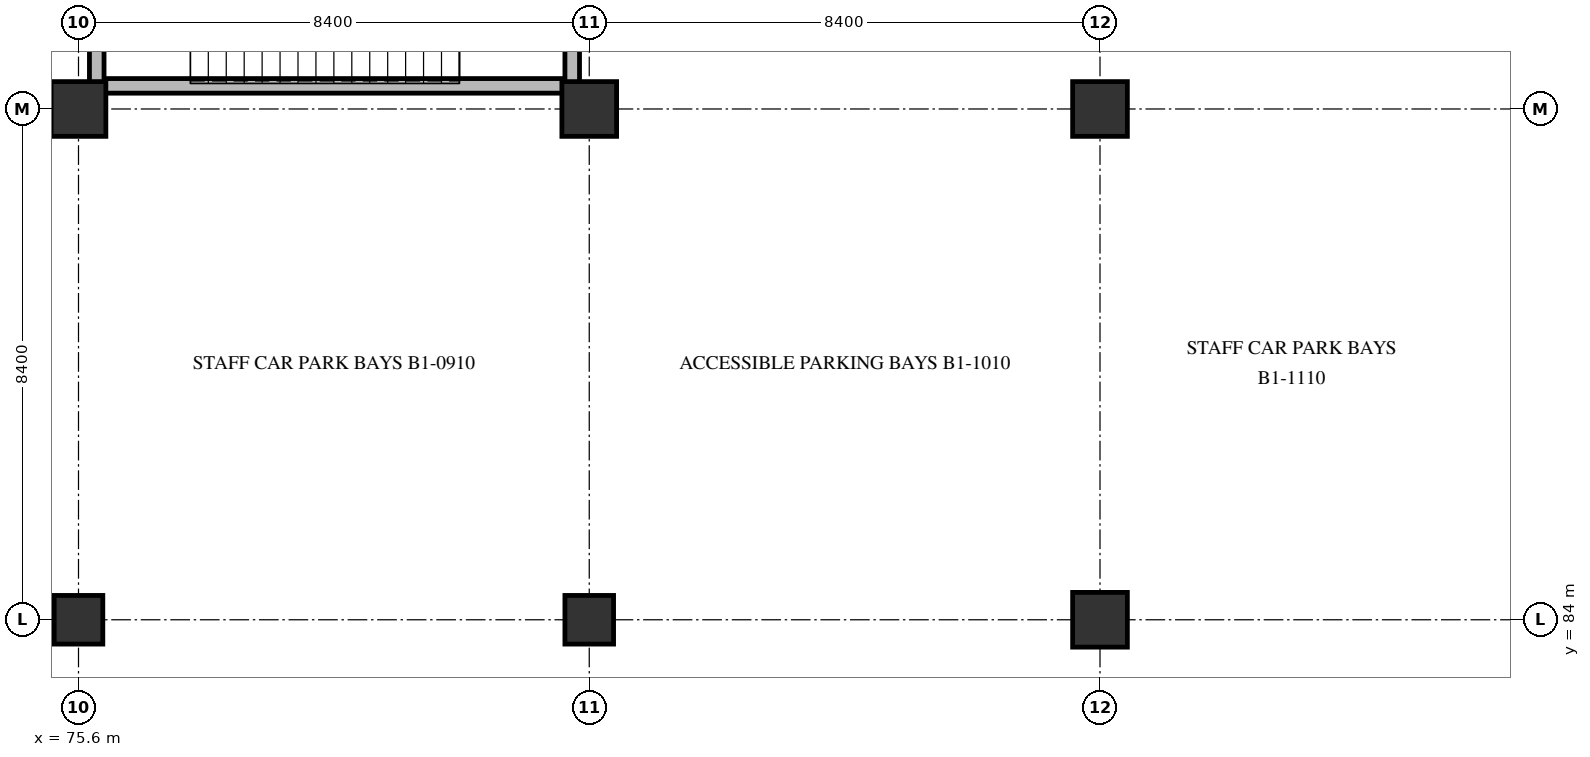
"""IFC4 building model, lengths in metres.
Left out: names, types, materials, properties, quantities, classifications, styles, units other than length and angle.
Written with IfcOpenShell. Run it as: python <this file> out.ifc"""

import sys

from ifc_helpers import new_model, si_unit, direction, frame, frame_2d, origin, origin_2d, place, context, subcontext, project, spatial, rectangle, extrude, element, save


model = new_model("IFC4")
c1 = context("Model", 3, precision=1e-05, world=origin(), true_north=direction((0.0, 1.0)))
c2 = subcontext(c1, "Body", "Model", "MODEL_VIEW")
j1 = project(units=[si_unit("LENGTHUNIT", "METRE"), si_unit("PLANEANGLEUNIT", "RADIAN")], contexts=[c1])
p1 = place(None, origin())
s1 = spatial("IfcSite", under=j1, at=p1, CompositionType="ELEMENT")
p2 = place(p1, origin())
s2 = spatial("IfcBuilding", under=s1, at=p2, CompositionType="ELEMENT")
p3 = place(p2, frame((0.0, 0.0, -5.4)))
s3 = spatial("IfcBuildingStorey", under=s2, at=p3, CompositionType="ELEMENT", Elevation=-5.4)
p4 = place(p3, frame((75.6, 84.0, 0.0), z_axis=(0.0, 0.0, 1.0), x_axis=(1.0, 0.0, 0.0)))
e1 = element("IfcColumn", 1, at=p4, inside=s3, PredefinedType="COLUMN", context=c2, shape_type="SweptSolid", body=[
    extrude(rectangle(XDim=0.8, YDim=0.8, at=origin_2d()), origin(), (0.0, 0.0, 1.0), 5.4),
])
p5 = place(p3, frame((75.6, 92.4, 0.0), z_axis=(0.0, 0.0, 1.0), x_axis=(1.0, 0.0, 0.0)))
e2 = element("IfcColumn", 2, at=p5, inside=s3, PredefinedType="COLUMN", context=c2, shape_type="SweptSolid", body=[
    extrude(rectangle(XDim=0.9, YDim=0.9, at=origin_2d()), origin(), (0.0, 0.0, 1.0), 5.4),
])
p6 = place(p3, frame((84.0, 84.0, 0.0), z_axis=(0.0, 0.0, 1.0), x_axis=(1.0, 0.0, 0.0)))
e3 = element("IfcColumn", 3, at=p6, inside=s3, PredefinedType="COLUMN", context=c2, shape_type="SweptSolid", body=[
    extrude(rectangle(XDim=0.8, YDim=0.8, at=origin_2d()), origin(), (0.0, 0.0, 1.0), 5.4),
])
for number, where, z_axis, x_axis in (
    (4, (84.0, 92.4, 0.0), (0.0, 0.0, 1.0), (1.0, 0.0, 0.0)),
    (5, (92.4, 84.0, 0.0), (0.0, 0.0, 1.0), (1.0, 0.0, 0.0)),
    (6, (92.4, 92.4, 0.0), (0.0, 0.0, 1.0), (1.0, 0.0, 0.0)),
):
    element("IfcColumn", number, at=place(p3, frame(where, z_axis=z_axis, x_axis=x_axis)), inside=s3, PredefinedType="COLUMN", context=c2, shape_type="SweptSolid", body=[
        extrude(rectangle(XDim=0.9, YDim=0.9, at=origin_2d()), origin(), (0.0, 0.0, 1.0), 5.4),
    ])
p7 = place(p3, frame((75.9, 92.78, 0.0), z_axis=(0.0, 0.0, 1.0), x_axis=(1.0, 0.0, 0.0)))
e7 = element("IfcWall", 7, at=p7, inside=s3, PredefinedType="SHEAR", context=c2, shape_type="SweptSolid", body=[
    extrude(rectangle(XDim=7.82, YDim=0.24, at=frame_2d((3.91, 0.0))), origin(), (0.0, 0.0, 1.0), 5.08),
])
for number, where, z_axis, x_axis in (
    (8, (75.9, 92.78, 0.0), (0.0, 0.0, 1.0), (0.0, 1.0, 0.0)),
    (9, (83.72, 92.78, 0.0), (0.0, 0.0, 1.0), (0.0, 1.0, 0.0)),
):
    element("IfcWall", number, at=place(p3, frame(where, z_axis=z_axis, x_axis=x_axis)), inside=s3, PredefinedType="SHEAR", context=c2, shape_type="SweptSolid", body=[
        extrude(rectangle(XDim=3.32, YDim=0.24, at=frame_2d((1.66, 0.0))), origin(), (0.0, 0.0, 1.0), 5.08),
    ])
save(model, sys.argv[1])
